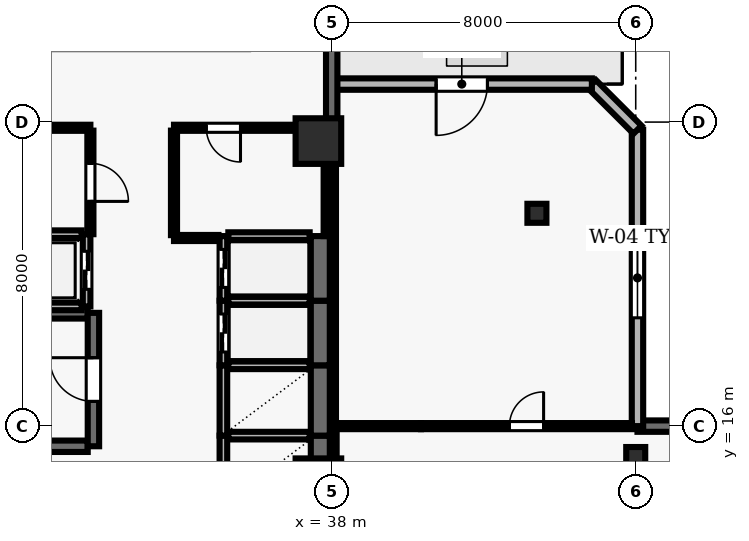
"""IFC4 building model, lengths in metres.
Left out: names, types, materials, properties, quantities, classifications, styles, units other than length and angle.
Written with IfcOpenShell. Run it as: python <this file> out.ifc"""

import sys

from ifc_helpers import new_model, si_unit, direction, frame, frame_2d, origin, origin_2d, place, context, subcontext, project, spatial, rectangle, hollow_rectangle, extrude, element, fill, save


model = new_model("IFC4")
c1 = context("Model", 3, precision=1e-05, world=origin(), true_north=direction((0.0, 1.0)))
c2 = subcontext(c1, "Body", "Model", "MODEL_VIEW")
j1 = project(units=[si_unit("LENGTHUNIT", "METRE"), si_unit("PLANEANGLEUNIT", "RADIAN")], contexts=[c1])
p1 = place(None, origin())
s1 = spatial("IfcSite", under=j1, at=p1, CompositionType="ELEMENT")
p2 = place(p1, origin())
s2 = spatial("IfcBuilding", under=s1, at=p2, CompositionType="ELEMENT")
p3 = place(p2, frame((0.0, 0.0, 142.4)))
s3 = spatial("IfcBuildingStorey", under=s2, at=p3, CompositionType="ELEMENT", Elevation=142.4)
for number, where, z_axis, x_axis in (
    (1, (37.65, 14.55, 0.0), (0.0, 0.0, 1.0), (1.0, 0.0, 0.0)),
    (2, (37.65, 23.5, 0.0), (0.0, 0.0, 1.0), (1.0, 0.0, 0.0)),
):
    element("IfcColumn", number, at=place(p3, frame(where, z_axis=z_axis, x_axis=x_axis)), inside=s3, PredefinedType="COLUMN", context=c2, shape_type="SweptSolid", body=[
        extrude(rectangle(XDim=1.2, YDim=1.2, at=origin_2d()), origin(), (0.0, 0.0, 1.0), 3.9),
    ])
for number, where, z_axis, x_axis in (
    (3, (46.0, 15.2, 0.0), (0.0, 0.0, 1.0), (1.0, 0.0, 0.0)),
    (4, (43.4, 21.6, 0.0), (0.0, 0.0, 1.0), (1.0, 0.0, 0.0)),
):
    element("IfcColumn", number, at=place(p3, frame(where, z_axis=z_axis, x_axis=x_axis)), inside=s3, PredefinedType="COLUMN", context=c2, shape_type="SweptSolid", body=[
        extrude(hollow_rectangle(XDim=0.5, YDim=0.5, WallThickness=0.025, at=origin_2d()), origin(), (0.0, 0.0, 1.0), 3.9),
    ])
p4 = place(p3, frame((68.1, 16.0, 0.0), z_axis=(0.0, 0.0, 1.0), x_axis=(-1.0, 0.0, 0.0)))
e5 = element("IfcWall", 5, at=p4, inside=s3, PredefinedType="SOLIDWALL", context=c2, shape_type="SweptSolid", body=[
    extrude(rectangle(XDim=22.054, YDim=0.3, at=frame_2d((11.027, 0.0))), origin(), (0.0, 0.0, 1.0), 3.69),
])
p5 = place(p4, frame((12.3, 0.0, 0.0)))
e6 = element("IfcOpeningElement", 6, at=p5, cuts=e5, PredefinedType="OPENING", context=c2, shape_type="SweptSolid", body=[
    extrude(rectangle(XDim=1.0, YDim=2.2, at=frame_2d((0.5, 1.1))), frame((0.0, 0.16, 0.0), z_axis=(0.0, -1.0, 0.0), x_axis=(1.0, 0.0, 0.0)), (0.0, 0.0, 1.0), 0.32),
])
p6 = place(p4, frame((1.857, 0.0, 0.9)))
e7 = element("IfcOpeningElement", 7, at=p6, cuts=e5, PredefinedType="OPENING", context=c2, shape_type="SweptSolid", body=[
    extrude(rectangle(XDim=1.8, YDim=1.6, at=frame_2d((0.9, 0.8))), frame((0.0, 0.16, 0.0), z_axis=(0.0, -1.0, 0.0), x_axis=(1.0, 0.0, 0.0)), (0.0, 0.0, 1.0), 0.32),
])
p7 = place(p4, frame((7.37, 0.0, 0.9)))
e8 = element("IfcOpeningElement", 8, at=p7, cuts=e5, PredefinedType="OPENING", context=c2, shape_type="SweptSolid", body=[
    extrude(rectangle(XDim=1.8, YDim=1.6, at=frame_2d((0.9, 0.8))), frame((0.0, 0.16, 0.0), z_axis=(0.0, -1.0, 0.0), x_axis=(1.0, 0.0, 0.0)), (0.0, 0.0, 1.0), 0.32),
])
p8 = place(p4, frame((13.784, 0.0, 0.9)))
e9 = element("IfcOpeningElement", 9, at=p8, cuts=e5, PredefinedType="OPENING", context=c2, shape_type="SweptSolid", body=[
    extrude(rectangle(XDim=1.8, YDim=1.6, at=frame_2d((0.9, 0.8))), frame((0.0, 0.16, 0.0), z_axis=(0.0, -1.0, 0.0), x_axis=(1.0, 0.0, 0.0)), (0.0, 0.0, 1.0), 0.32),
])
p9 = place(p4, frame((18.397, 0.0, 0.9)))
e10 = element("IfcOpeningElement", 10, at=p9, cuts=e5, PredefinedType="OPENING", context=c2, shape_type="SweptSolid", body=[
    extrude(rectangle(XDim=1.8, YDim=1.6, at=frame_2d((0.9, 0.8))), frame((0.0, 0.16, 0.0), z_axis=(0.0, -1.0, 0.0), x_axis=(1.0, 0.0, 0.0)), (0.0, 0.0, 1.0), 0.32),
])
p10 = place(p3, frame((46.046, 16.0, 0.0), z_axis=(0.0, 0.0, 1.0), x_axis=(0.0, 1.0, 0.0)))
e11 = element("IfcWall", 11, at=p10, inside=s3, PredefinedType="SOLIDWALL", context=c2, shape_type="SweptSolid", body=[
    extrude(rectangle(XDim=7.8, YDim=0.3, at=frame_2d((3.9, 0.0))), origin(), (0.0, 0.0, 1.0), 3.69),
])
p11 = place(p10, frame((2.85, 0.0, 0.9)))
e12 = element("IfcOpeningElement", 12, at=p11, cuts=e11, PredefinedType="OPENING", context=c2, shape_type="SweptSolid", body=[
    extrude(rectangle(XDim=2.1, YDim=1.6, at=frame_2d((1.05, 0.8))), frame((0.0, 0.16, 0.0), z_axis=(0.0, -1.0, 0.0), x_axis=(1.0, 0.0, 0.0)), (0.0, 0.0, 1.0), 0.32),
])
p12 = place(p3, frame((46.046, 23.8, 0.0), z_axis=(0.0, 0.0, 1.0), x_axis=(-0.707106781187, 0.707106781187, 0.0)))
e13 = element("IfcWall", 13, at=p12, inside=s3, PredefinedType="SOLIDWALL", context=c2, shape_type="SweptSolid", body=[
    extrude(rectangle(XDim=1.697, YDim=0.3, at=frame_2d((0.849, 0.0))), origin(), (0.0, 0.0, 1.0), 3.69),
])
p13 = place(p3, frame((44.846, 25.0, 0.0), z_axis=(0.0, 0.0, 1.0), x_axis=(-1.0, 0.0, 0.0)))
e14 = element("IfcWall", 14, at=p13, inside=s3, PredefinedType="SOLIDWALL", context=c2, shape_type="SweptSolid", body=[
    extrude(rectangle(XDim=6.846, YDim=0.3, at=frame_2d((3.423, 0.0))), origin(), (0.0, 0.0, 1.0), 3.69),
])
p14 = place(p13, frame((2.748, 0.0, 0.0)))
e15 = element("IfcOpeningElement", 15, at=p14, cuts=e14, PredefinedType="OPENING", context=c2, shape_type="SweptSolid", body=[
    extrude(rectangle(XDim=1.35, YDim=2.2, at=frame_2d((0.675, 1.1))), frame((0.0, 0.16, 0.0), z_axis=(0.0, -1.0, 0.0), x_axis=(1.0, 0.0, 0.0)), (0.0, 0.0, 1.0), 0.32),
])
p15 = place(p3, frame((38.0, 24.0, 0.0), z_axis=(0.0, 0.0, 1.0), x_axis=(0.0, 1.0, 0.0)))
e16 = element("IfcWall", 16, at=p15, inside=s3, PredefinedType="SOLIDWALL", context=c2, shape_type="SweptSolid", body=[
    extrude(rectangle(XDim=22.1, YDim=0.3, at=frame_2d((11.05, 0.0))), origin(), (0.0, 0.0, 1.0), 3.69),
])
p16 = place(p15, frame((13.075, 0.0, 0.0)))
e17 = element("IfcOpeningElement", 17, at=p16, cuts=e16, PredefinedType="OPENING", context=c2, shape_type="SweptSolid", body=[
    extrude(rectangle(XDim=1.0, YDim=2.2, at=frame_2d((0.5, 1.1))), frame((0.0, 0.16, 0.0), z_axis=(0.0, -1.0, 0.0), x_axis=(1.0, 0.0, 0.0)), (0.0, 0.0, 1.0), 0.32),
])
p17 = place(p15, frame((2.617, 0.0, 0.9)))
e18 = element("IfcOpeningElement", 18, at=p17, cuts=e16, PredefinedType="OPENING", context=c2, shape_type="SweptSolid", body=[
    extrude(rectangle(XDim=1.8, YDim=1.8, at=frame_2d((0.9, 0.9))), frame((0.0, 0.16, 0.0), z_axis=(0.0, -1.0, 0.0), x_axis=(1.0, 0.0, 0.0)), (0.0, 0.0, 1.0), 0.32),
])
p18 = place(p15, frame((17.133, 0.0, 0.9)))
e19 = element("IfcOpeningElement", 19, at=p18, cuts=e16, PredefinedType="OPENING", context=c2, shape_type="SweptSolid", body=[
    extrude(rectangle(XDim=1.8, YDim=1.8, at=frame_2d((0.9, 0.9))), frame((0.0, 0.16, 0.0), z_axis=(0.0, -1.0, 0.0), x_axis=(1.0, 0.0, 0.0)), (0.0, 0.0, 1.0), 0.32),
])
for number, where, z_axis, x_axis in (
    (20, (31.58, 18.98, 0.0), (0.0, 0.0, 1.0), (-1.0, 0.0, 0.0)),
    (21, (23.22, 15.47, 0.0), (0.0, 0.0, 1.0), (1.0, 0.0, 0.0)),
):
    element("IfcWall", number, at=place(p3, frame(where, z_axis=z_axis, x_axis=x_axis)), inside=s3, PredefinedType="SHEAR", context=c2, shape_type="SweptSolid", body=[
        extrude(rectangle(XDim=8.36, YDim=0.3, at=frame_2d((4.18, 0.0))), origin(), (0.0, 0.0, 1.0), 3.69),
    ])
p19 = place(p3, frame((31.73, 15.47, 0.0), z_axis=(0.0, 0.0, 1.0), x_axis=(0.0, 1.0, 0.0)))
e22 = element("IfcWall", 22, at=p19, inside=s3, PredefinedType="SHEAR", context=c2, shape_type="SweptSolid", body=[
    extrude(rectangle(XDim=3.51, YDim=0.3, at=frame_2d((1.755, 0.0))), origin(), (0.0, 0.0, 1.0), 3.69),
])
p20 = place(p19, frame((1.18, 0.0, 0.0)))
e23 = element("IfcOpeningElement", 23, at=p20, cuts=e22, PredefinedType="OPENING", context=c2, shape_type="SweptSolid", body=[
    extrude(rectangle(XDim=1.15, YDim=2.15, at=frame_2d((0.575, 1.075))), frame((0.0, 0.16, 0.0), z_axis=(0.0, -1.0, 0.0), x_axis=(1.0, 0.0, 0.0)), (0.0, 0.0, 1.0), 0.32),
])
p21 = place(p3, frame((35.15, 15.75, 0.0), z_axis=(0.0, 0.0, 1.0), x_axis=(0.0, -1.0, 0.0)))
e24 = element("IfcWall", 24, at=p21, inside=s3, PredefinedType="SOLIDWALL", context=c2, shape_type="SweptSolid", body=[
    extrude(rectangle(XDim=1.85, YDim=0.2, at=frame_2d((0.925, 0.0))), origin(), (0.0, 0.0, 1.0), 3.69),
])
p22 = place(p3, frame((37.7, 13.9, 0.0), z_axis=(0.0, 0.0, 1.0), x_axis=(0.0, 1.0, 0.0)))
e25 = element("IfcWall", 25, at=p22, inside=s3, PredefinedType="SHEAR", context=c2, shape_type="SweptSolid", body=[
    extrude(rectangle(XDim=1.85, YDim=0.5, at=frame_2d((0.925, 0.0))), origin(), (0.0, 0.0, 1.0), 3.69),
])
p23 = place(p3, frame((37.42, 15.75, 0.0), z_axis=(0.0, 0.0, 1.0), x_axis=(-1.0, 0.0, 0.0)))
e26 = element("IfcWall", 26, at=p23, inside=s3, PredefinedType="SOLIDWALL", context=c2, shape_type="SweptSolid", body=[
    extrude(rectangle(XDim=2.14, YDim=0.2, at=frame_2d((1.07, 0.0))), origin(), (0.0, 0.0, 1.0), 3.69),
])
p24 = place(p3, frame((35.15, 17.6, 0.0), z_axis=(0.0, 0.0, 1.0), x_axis=(0.0, -1.0, 0.0)))
e27 = element("IfcWall", 27, at=p24, inside=s3, PredefinedType="SOLIDWALL", context=c2, shape_type="SweptSolid", body=[
    extrude(rectangle(XDim=1.85, YDim=0.2, at=frame_2d((0.925, 0.0))), origin(), (0.0, 0.0, 1.0), 3.69),
])
p25 = place(p3, frame((37.7, 15.75, 0.0), z_axis=(0.0, 0.0, 1.0), x_axis=(0.0, 1.0, 0.0)))
e28 = element("IfcWall", 28, at=p25, inside=s3, PredefinedType="SHEAR", context=c2, shape_type="SweptSolid", body=[
    extrude(rectangle(XDim=1.85, YDim=0.5, at=frame_2d((0.925, 0.0))), origin(), (0.0, 0.0, 1.0), 3.69),
])
p26 = place(p3, frame((37.42, 17.6, 0.0), z_axis=(0.0, 0.0, 1.0), x_axis=(-1.0, 0.0, 0.0)))
e29 = element("IfcWall", 29, at=p26, inside=s3, PredefinedType="SOLIDWALL", context=c2, shape_type="SweptSolid", body=[
    extrude(rectangle(XDim=2.14, YDim=0.2, at=frame_2d((1.07, 0.0))), origin(), (0.0, 0.0, 1.0), 3.69),
])
p27 = place(p3, frame((35.15, 19.3, 0.0), z_axis=(0.0, 0.0, 1.0), x_axis=(0.0, -1.0, 0.0)))
e30 = element("IfcWall", 30, at=p27, inside=s3, PredefinedType="SOLIDWALL", context=c2, shape_type="SweptSolid", body=[
    extrude(rectangle(XDim=1.7, YDim=0.2, at=frame_2d((0.85, 0.0))), origin(), (0.0, 0.0, 1.0), 3.69),
])
p28 = place(p27, frame((0.35, 0.0, 0.0)))
e31 = element("IfcOpeningElement", 31, at=p28, cuts=e30, PredefinedType="OPENING", context=c2, shape_type="SweptSolid", body=[
    extrude(rectangle(XDim=1.0, YDim=2.1, at=frame_2d((0.5, 1.05))), frame((0.0, 0.11, 0.0), z_axis=(0.0, -1.0, 0.0), x_axis=(1.0, 0.0, 0.0)), (0.0, 0.0, 1.0), 0.22),
])
p29 = place(p3, frame((37.7, 17.6, 0.0), z_axis=(0.0, 0.0, 1.0), x_axis=(0.0, 1.0, 0.0)))
e32 = element("IfcWall", 32, at=p29, inside=s3, PredefinedType="SHEAR", context=c2, shape_type="SweptSolid", body=[
    extrude(rectangle(XDim=1.7, YDim=0.5, at=frame_2d((0.85, 0.0))), origin(), (0.0, 0.0, 1.0), 3.69),
])
p30 = place(p3, frame((37.42, 19.3, 0.0), z_axis=(0.0, 0.0, 1.0), x_axis=(-1.0, 0.0, 0.0)))
e33 = element("IfcWall", 33, at=p30, inside=s3, PredefinedType="SOLIDWALL", context=c2, shape_type="SweptSolid", body=[
    extrude(rectangle(XDim=2.14, YDim=0.2, at=frame_2d((1.07, 0.0))), origin(), (0.0, 0.0, 1.0), 3.69),
])
p31 = place(p3, frame((35.15, 21.0, 0.0), z_axis=(0.0, 0.0, 1.0), x_axis=(0.0, -1.0, 0.0)))
e34 = element("IfcWall", 34, at=p31, inside=s3, PredefinedType="SOLIDWALL", context=c2, shape_type="SweptSolid", body=[
    extrude(rectangle(XDim=1.7, YDim=0.2, at=frame_2d((0.85, 0.0))), origin(), (0.0, 0.0, 1.0), 3.69),
])
p32 = place(p31, frame((0.35, 0.0, 0.0)))
e35 = element("IfcOpeningElement", 35, at=p32, cuts=e34, PredefinedType="OPENING", context=c2, shape_type="SweptSolid", body=[
    extrude(rectangle(XDim=1.0, YDim=2.1, at=frame_2d((0.5, 1.05))), frame((0.0, 0.11, 0.0), z_axis=(0.0, -1.0, 0.0), x_axis=(1.0, 0.0, 0.0)), (0.0, 0.0, 1.0), 0.22),
])
p33 = place(p3, frame((37.7, 19.3, 0.0), z_axis=(0.0, 0.0, 1.0), x_axis=(0.0, 1.0, 0.0)))
e36 = element("IfcWall", 36, at=p33, inside=s3, PredefinedType="SHEAR", context=c2, shape_type="SweptSolid", body=[
    extrude(rectangle(XDim=1.7, YDim=0.5, at=frame_2d((0.85, 0.0))), origin(), (0.0, 0.0, 1.0), 3.69),
])
p34 = place(p3, frame((37.42, 21.0, 0.0), z_axis=(0.0, 0.0, 1.0), x_axis=(-1.0, 0.0, 0.0)))
e37 = element("IfcWall", 37, at=p34, inside=s3, PredefinedType="SOLIDWALL", context=c2, shape_type="SweptSolid", body=[
    extrude(rectangle(XDim=2.14, YDim=0.2, at=frame_2d((1.07, 0.0))), origin(), (0.0, 0.0, 1.0), 3.69),
])
p35 = place(p3, frame((31.55, 19.15, 0.0), z_axis=(0.0, 0.0, 1.0), x_axis=(0.0, 1.0, 0.0)))
e38 = element("IfcWall", 38, at=p35, inside=s3, PredefinedType="SOLIDWALL", context=c2, shape_type="SweptSolid", body=[
    extrude(rectangle(XDim=1.9, YDim=0.2, at=frame_2d((0.95, 0.0))), origin(), (0.0, 0.0, 1.0), 3.69),
])
p36 = place(p35, frame((0.45, 0.0, 0.0)))
e39 = element("IfcOpeningElement", 39, at=p36, cuts=e38, PredefinedType="OPENING", context=c2, shape_type="SweptSolid", body=[
    extrude(rectangle(XDim=1.0, YDim=2.1, at=frame_2d((0.5, 1.05))), frame((0.0, 0.11, 0.0), z_axis=(0.0, -1.0, 0.0), x_axis=(1.0, 0.0, 0.0)), (0.0, 0.0, 1.0), 0.22),
])
for number, where, z_axis, x_axis in (
    (40, (28.98, 19.15, 0.0), (0.0, 0.0, 1.0), (1.0, 0.0, 0.0)),
    (41, (31.42, 21.05, 0.0), (0.0, 0.0, 1.0), (-1.0, 0.0, 0.0)),
):
    element("IfcWall", number, at=place(p3, frame(where, z_axis=z_axis, x_axis=x_axis)), inside=s3, PredefinedType="SOLIDWALL", context=c2, shape_type="SweptSolid", body=[
        extrude(rectangle(XDim=2.44, YDim=0.2, at=frame_2d((1.22, 0.0))), origin(), (0.0, 0.0, 1.0), 3.69),
    ])
p37 = place(p3, frame((31.65, 23.85, 0.0), z_axis=(0.0, 0.0, 1.0), x_axis=(-1.0, 0.0, 0.0)))
e42 = element("IfcWall", 42, at=p37, inside=s3, PredefinedType="PARTITIONING", context=c2, shape_type="SweptSolid", body=[
    extrude(rectangle(XDim=5.45, YDim=0.16, at=frame_2d((2.725, 0.0))), origin(), (0.0, 0.0, 1.0), 3.074),
])
p38 = place(p3, frame((35.02, 20.95, 0.0), z_axis=(0.0, 0.0, 1.0), x_axis=(-1.0, 0.0, 0.0)))
e43 = element("IfcWall", 43, at=p38, inside=s3, PredefinedType="PARTITIONING", context=c2, shape_type="SweptSolid", body=[
    extrude(rectangle(XDim=1.17, YDim=0.16, at=frame_2d((0.585, 0.0))), origin(), (0.0, 0.0, 1.0), 3.69),
])
p39 = place(p3, frame((37.85, 23.85, 0.0), z_axis=(0.0, 0.0, 1.0), x_axis=(-1.0, 0.0, 0.0)))
e44 = element("IfcWall", 44, at=p39, inside=s3, PredefinedType="PARTITIONING", context=c2, shape_type="SweptSolid", body=[
    extrude(rectangle(XDim=4.0, YDim=0.16, at=frame_2d((2.0, 0.0))), origin(), (0.0, 0.0, 1.0), 3.074),
])
p40 = place(p39, frame((2.25, 0.0, 0.0)))
e45 = element("IfcOpeningElement", 45, at=p40, cuts=e44, PredefinedType="OPENING", context=c2, shape_type="SweptSolid", body=[
    extrude(rectangle(XDim=0.9, YDim=2.1, at=frame_2d((0.45, 1.05))), frame((0.0, 0.09, 0.0), z_axis=(0.0, -1.0, 0.0), x_axis=(1.0, 0.0, 0.0)), (0.0, 0.0, 1.0), 0.18),
])
p41 = place(p3, frame((40.35, 16.0, 0.0), z_axis=(0.0, 0.0, 1.0), x_axis=(-1.0, 0.0, 0.0)))
e46 = element("IfcWall", 46, at=p41, inside=s3, PredefinedType="PARTITIONING", context=c2, shape_type="SweptSolid", body=[
    extrude(rectangle(XDim=2.3, YDim=0.16, at=frame_2d((1.15, 0.0))), origin(), (0.0, 0.0, 1.0), 3.69),
])
p42 = place(p3, frame((40.35, 16.0, 0.0), z_axis=(0.0, 0.0, 1.0), x_axis=(1.0, 0.0, 0.0)))
e47 = element("IfcWall", 47, at=p42, inside=s3, PredefinedType="PARTITIONING", context=c2, shape_type="SweptSolid", body=[
    extrude(rectangle(XDim=5.551, YDim=0.16, at=frame_2d((2.775, 0.0))), origin(), (0.0, 0.0, 1.0), 3.69),
])
p43 = place(p42, frame((2.326, 0.0, 0.0)))
e48 = element("IfcOpeningElement", 48, at=p43, cuts=e47, PredefinedType="OPENING", context=c2, shape_type="SweptSolid", body=[
    extrude(rectangle(XDim=0.9, YDim=2.1, at=frame_2d((0.45, 1.05))), frame((0.0, 0.09, 0.0), z_axis=(0.0, -1.0, 0.0), x_axis=(1.0, 0.0, 0.0)), (0.0, 0.0, 1.0), 0.18),
])
p44 = place(p3, frame((31.65, 23.775, 0.0), z_axis=(0.0, 0.0, 1.0), x_axis=(0.0, -1.0, 0.0)))
e49 = element("IfcWall", 49, at=p44, inside=s3, PredefinedType="PARTITIONING", context=c2, shape_type="SweptSolid", body=[
    extrude(rectangle(XDim=2.725, YDim=0.16, at=frame_2d((1.362, 0.0))), origin(), (0.0, 0.0, 1.0), 3.69),
])
p45 = place(p44, frame((0.862, 0.0, 0.0)))
e50 = element("IfcOpeningElement", 50, at=p45, cuts=e49, PredefinedType="OPENING", context=c2, shape_type="SweptSolid", body=[
    extrude(rectangle(XDim=1.0, YDim=2.1, at=frame_2d((0.5, 1.05))), frame((0.0, 0.09, 0.0), z_axis=(0.0, -1.0, 0.0), x_axis=(1.0, 0.0, 0.0)), (0.0, 0.0, 1.0), 0.18),
])
p46 = place(p3, frame((33.85, 21.025, 0.0), z_axis=(0.0, 0.0, 1.0), x_axis=(0.0, 1.0, 0.0)))
e51 = element("IfcWall", 51, at=p46, inside=s3, PredefinedType="PARTITIONING", context=c2, shape_type="SweptSolid", body=[
    extrude(rectangle(XDim=2.75, YDim=0.16, at=frame_2d((1.375, 0.0))), origin(), (0.0, 0.0, 1.0), 3.69),
])
p47 = place(p3, frame((37.85, 21.0, 0.0), z_axis=(0.0, 0.0, 1.0), x_axis=(0.0, 1.0, 0.0)))
e52 = element("IfcWall", 52, at=p47, inside=s3, PredefinedType="PARTITIONING", context=c2, shape_type="SweptSolid", body=[
    extrude(rectangle(XDim=2.775, YDim=0.125, at=frame_2d((1.387, 0.0))), origin(), (0.0, 0.0, 1.0), 3.074),
])
p48 = place(p3, frame((38.05, 15.925, 0.0), z_axis=(0.0, 0.0, 1.0), x_axis=(0.0, -1.0, 0.0)))
e53 = element("IfcWall", 53, at=p48, inside=s3, PredefinedType="PARTITIONING", context=c2, shape_type="SweptSolid", body=[
    extrude(rectangle(XDim=6.375, YDim=0.16, at=frame_2d((3.188, 0.0))), origin(), (0.0, 0.0, 1.0), 3.074),
])
p49 = place(p3, frame((38.05, 24.0, 0.0), z_axis=(0.0, 0.0, 1.0), x_axis=(0.0, -1.0, 0.0)))
e54 = element("IfcWall", 54, at=p49, inside=s3, PredefinedType="PARTITIONING", context=c2, shape_type="SweptSolid", body=[
    extrude(rectangle(XDim=7.925, YDim=0.125, at=frame_2d((3.962, 0.0))), origin(), (0.0, 0.0, 1.0), 3.074),
])
p50 = place(p11, origin())
e55 = element("IfcWindow", 55, at=p50, inside=s3, PartitioningType="SINGLE_PANEL", PredefinedType="WINDOW", context=c2, shape_type="SweptSolid", body=[
    extrude(rectangle(XDim=2.1, YDim=1.6, at=frame_2d((1.05, 0.8))), frame((0.0, 0.03, 0.0), z_axis=(0.0, -1.0, 0.0), x_axis=(1.0, 0.0, 0.0)), (0.0, 0.0, 1.0), 0.06),
])
fill(e12, e55)
p51 = place(p14, origin())
e56 = element("IfcDoor", 56, at=p51, inside=s3, OperationType="SINGLE_SWING_RIGHT", PredefinedType="DOOR", context=c2, shape_type="SweptSolid", body=[
    extrude(rectangle(XDim=1.35, YDim=2.2, at=frame_2d((0.675, 1.1))), frame((0.0, 0.025, 0.0), z_axis=(0.0, -1.0, 0.0), x_axis=(1.0, 0.0, 0.0)), (0.0, 0.0, 1.0), 0.05),
])
fill(e15, e56)
p52 = place(p20, origin())
e57 = element("IfcDoor", 57, at=p52, inside=s3, OperationType="SINGLE_SWING_RIGHT", PredefinedType="DOOR", context=c2, shape_type="SweptSolid", body=[
    extrude(rectangle(XDim=1.15, YDim=2.15, at=frame_2d((0.575, 1.075))), frame((0.0, 0.025, 0.0), z_axis=(0.0, -1.0, 0.0), x_axis=(1.0, 0.0, 0.0)), (0.0, 0.0, 1.0), 0.05),
])
fill(e23, e57)
p53 = place(p28, origin())
e58 = element("IfcDoor", 58, at=p53, inside=s3, OperationType="DOUBLE_DOOR_SLIDING", PredefinedType="DOOR", context=c2, shape_type="SweptSolid", body=[
    extrude(rectangle(XDim=1.0, YDim=2.1, at=frame_2d((0.5, 1.05))), frame((0.0, 0.025, 0.0), z_axis=(0.0, -1.0, 0.0), x_axis=(1.0, 0.0, 0.0)), (0.0, 0.0, 1.0), 0.05),
])
fill(e31, e58)
p54 = place(p32, origin())
e59 = element("IfcDoor", 59, at=p54, inside=s3, OperationType="DOUBLE_DOOR_SLIDING", PredefinedType="DOOR", context=c2, shape_type="SweptSolid", body=[
    extrude(rectangle(XDim=1.0, YDim=2.1, at=frame_2d((0.5, 1.05))), frame((0.0, 0.025, 0.0), z_axis=(0.0, -1.0, 0.0), x_axis=(1.0, 0.0, 0.0)), (0.0, 0.0, 1.0), 0.05),
])
fill(e35, e59)
p55 = place(p36, origin())
e60 = element("IfcDoor", 60, at=p55, inside=s3, OperationType="DOUBLE_DOOR_SLIDING", PredefinedType="DOOR", context=c2, shape_type="SweptSolid", body=[
    extrude(rectangle(XDim=1.0, YDim=2.1, at=frame_2d((0.5, 1.05))), frame((0.0, 0.025, 0.0), z_axis=(0.0, -1.0, 0.0), x_axis=(1.0, 0.0, 0.0)), (0.0, 0.0, 1.0), 0.05),
])
fill(e39, e60)
p56 = place(p40, origin())
e61 = element("IfcDoor", 61, at=p56, inside=s3, OperationType="SINGLE_SWING_LEFT", PredefinedType="DOOR", context=c2, shape_type="SweptSolid", body=[
    extrude(rectangle(XDim=0.9, YDim=2.1, at=frame_2d((0.45, 1.05))), frame((0.0, 0.025, 0.0), z_axis=(0.0, -1.0, 0.0), x_axis=(1.0, 0.0, 0.0)), (0.0, 0.0, 1.0), 0.05),
])
fill(e45, e61)
p57 = place(p45, origin())
e62 = element("IfcDoor", 62, at=p57, inside=s3, OperationType="SINGLE_SWING_RIGHT", PredefinedType="DOOR", context=c2, shape_type="SweptSolid", body=[
    extrude(rectangle(XDim=1.0, YDim=2.1, at=frame_2d((0.5, 1.05))), frame((0.0, 0.025, 0.0), z_axis=(0.0, -1.0, 0.0), x_axis=(1.0, 0.0, 0.0)), (0.0, 0.0, 1.0), 0.05),
])
fill(e50, e62)
p58 = place(p43, origin())
e63 = element("IfcDoor", 63, at=p58, inside=s3, OperationType="SINGLE_SWING_RIGHT", PredefinedType="DOOR", context=c2, shape_type="SweptSolid", body=[
    extrude(rectangle(XDim=0.9, YDim=2.1, at=frame_2d((0.45, 1.05))), frame((0.0, 0.025, 0.0), z_axis=(0.0, -1.0, 0.0), x_axis=(1.0, 0.0, 0.0)), (0.0, 0.0, 1.0), 0.05),
])
fill(e48, e63)
save(model, sys.argv[1])
